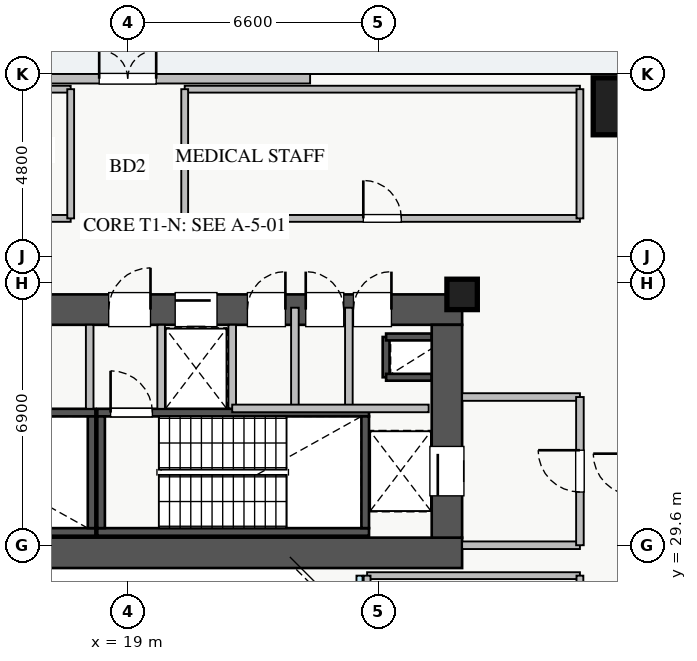
"""IFC4 building model, lengths in metres.
Left out: names, types, materials, properties, quantities, classifications, styles, units other than length and angle.
Written with IfcOpenShell. Run it as: python <this file> out.ifc"""

import sys

from ifc_helpers import new_model, si_unit, direction, frame, frame_2d, origin, origin_2d, place, context, subcontext, project, spatial, rectangle, extrude, source, transform, mapped, element, fill, save


model = new_model("IFC4")
c1 = context("Model", 3, precision=1e-05, world=origin(), true_north=direction((0.0, 1.0)))
c2 = subcontext(c1, "Body", "Model", "MODEL_VIEW")
j1 = project(units=[si_unit("LENGTHUNIT", "METRE"), si_unit("PLANEANGLEUNIT", "RADIAN")], contexts=[c1])
p1 = place(None, origin())
s1 = spatial("IfcSite", under=j1, at=p1, CompositionType="ELEMENT")
p2 = place(p1, origin())
s2 = spatial("IfcBuilding", under=s1, at=p2, CompositionType="ELEMENT")
p3 = place(p2, frame((0.0, 0.0, 9.4)))
s3 = spatial("IfcBuildingStorey", under=s2, at=p3, CompositionType="ELEMENT", Elevation=9.4)
p4 = place(p3, frame((25.8, 34.02, 0.0), z_axis=(0.0, 0.0, 1.0), x_axis=(0.0, 1.0, 0.0)))
e1 = element("IfcWall", 1, at=p4, inside=s3, PredefinedType="SHEAR", context=c2, shape_type="SweptSolid", body=[
    extrude(rectangle(XDim=1.06, YDim=0.18, at=frame_2d((0.53, 0.0))), origin(), (0.0, 0.0, 1.0), 4.18),
])
for number, where, z_axis, x_axis in (
    (2, (25.8, 35.08, 0.0), (0.0, 0.0, 1.0), (1.0, 0.0, 0.0)),
    (3, (25.8, 34.02, 0.0), (0.0, 0.0, 1.0), (1.0, 0.0, 0.0)),
):
    element("IfcWall", number, at=place(p3, frame(where, z_axis=z_axis, x_axis=x_axis)), inside=s3, PredefinedType="SHEAR", context=c2, shape_type="SweptSolid", body=[
        extrude(rectangle(XDim=1.2, YDim=0.18, at=frame_2d((0.6, 0.0))), origin(), (0.0, 0.0, 1.0), 4.18),
    ])
p5 = place(p3, frame((19.88, 33.2, 0.0), z_axis=(0.0, 0.0, 1.0), x_axis=(1.0, 0.0, 0.0)))
e4 = element("IfcWall", 4, at=p5, inside=s3, PredefinedType="SHEAR", context=c2, shape_type="SweptSolid", body=[
    extrude(rectangle(XDim=1.87, YDim=0.18, at=frame_2d((0.935, 0.0))), origin(), (0.0, 0.0, 1.0), 4.18),
])
p6 = place(p3, frame((11.0, 29.95, 0.0), z_axis=(0.0, 0.0, 1.0), x_axis=(1.0, 0.0, 0.0)))
e5 = element("IfcWall", 5, at=p6, inside=s3, PredefinedType="SHEAR", context=c2, shape_type="SweptSolid", body=[
    extrude(rectangle(XDim=7.15, YDim=0.2, at=frame_2d((3.575, 0.0))), origin(), (0.0, 0.0, 1.0), 4.4),
])
p7 = place(p3, frame((11.0, 33.09, 0.0), z_axis=(0.0, 0.0, 1.0), x_axis=(1.0, 0.0, 0.0)))
e6 = element("IfcWall", 6, at=p7, inside=s3, PredefinedType="SHEAR", context=c2, shape_type="SweptSolid", body=[
    extrude(rectangle(XDim=7.15, YDim=0.2, at=frame_2d((3.575, 0.0))), origin(), (0.0, 0.0, 1.0), 4.4),
])
p8 = place(p7, frame((0.35, 0.0, 0.0)))
e7 = element("IfcOpeningElement", 7, at=p8, cuts=e6, PredefinedType="OPENING", context=c2, shape_type="SweptSolid", body=[
    extrude(rectangle(XDim=1.1, YDim=2.05, at=frame_2d((0.55, 1.025))), frame((0.0, 0.11, 0.0), z_axis=(0.0, -1.0, 0.0), x_axis=(1.0, 0.0, 0.0)), (0.0, 0.0, 1.0), 0.22),
])
p9 = place(p3, frame((18.05, 30.05, 0.0), z_axis=(0.0, 0.0, 1.0), x_axis=(0.0, 1.0, 0.0)))
e8 = element("IfcWall", 8, at=p9, inside=s3, PredefinedType="SHEAR", context=c2, shape_type="SweptSolid", body=[
    extrude(rectangle(XDim=2.94, YDim=0.2, at=frame_2d((1.47, 0.0))), origin(), (0.0, 0.0, 1.0), 4.4),
])
p10 = place(p3, frame((18.2, 29.95, 0.0), z_axis=(0.0, 0.0, 1.0), x_axis=(1.0, 0.0, 0.0)))
e9 = element("IfcWall", 9, at=p10, inside=s3, PredefinedType="SHEAR", context=c2, shape_type="SweptSolid", body=[
    extrude(rectangle(XDim=7.15, YDim=0.2, at=frame_2d((3.575, 0.0))), origin(), (0.0, 0.0, 1.0), 4.4),
])
p11 = place(p3, frame((18.2, 33.09, 0.0), z_axis=(0.0, 0.0, 1.0), x_axis=(1.0, 0.0, 0.0)))
e10 = element("IfcWall", 10, at=p11, inside=s3, PredefinedType="SHEAR", context=c2, shape_type="SweptSolid", body=[
    extrude(rectangle(XDim=7.15, YDim=0.2, at=frame_2d((3.575, 0.0))), origin(), (0.0, 0.0, 1.0), 4.4),
])
p12 = place(p11, frame((0.35, 0.0, 0.0)))
e11 = element("IfcOpeningElement", 11, at=p12, cuts=e10, PredefinedType="OPENING", context=c2, shape_type="SweptSolid", body=[
    extrude(rectangle(XDim=1.1, YDim=2.05, at=frame_2d((0.55, 1.025))), frame((0.0, 0.11, 0.0), z_axis=(0.0, -1.0, 0.0), x_axis=(1.0, 0.0, 0.0)), (0.0, 0.0, 1.0), 0.22),
])
for number, where, z_axis, x_axis in (
    (12, (18.3, 30.05, 0.0), (0.0, 0.0, 1.0), (0.0, 1.0, 0.0)),
    (13, (25.25, 30.05, 0.0), (0.0, 0.0, 1.0), (0.0, 1.0, 0.0)),
):
    element("IfcWall", number, at=place(p3, frame(where, z_axis=z_axis, x_axis=x_axis)), inside=s3, PredefinedType="SHEAR", context=c2, shape_type="SweptSolid", body=[
        extrude(rectangle(XDim=2.94, YDim=0.2, at=frame_2d((1.47, 0.0))), origin(), (0.0, 0.0, 1.0), 4.4),
    ])
p13 = place(p3, frame((10.2, 29.4, 0.0), z_axis=(0.0, 0.0, 1.0), x_axis=(1.0, 0.0, 0.0)))
e14 = element("IfcWall", 14, at=p13, inside=s3, PredefinedType="SHEAR", context=c2, shape_type="SweptSolid", body=[
    extrude(rectangle(XDim=17.6, YDim=0.8, at=frame_2d((8.8, 0.0))), origin(), (0.0, 0.0, 1.0), 4.4),
])
p14 = place(p3, frame((10.2, 35.8, 0.0), z_axis=(0.0, 0.0, 1.0), x_axis=(1.0, 0.0, 0.0)))
e15 = element("IfcWall", 15, at=p14, inside=s3, PredefinedType="SHEAR", context=c2, shape_type="SweptSolid", body=[
    extrude(rectangle(XDim=17.6, YDim=0.8, at=frame_2d((8.8, 0.0))), origin(), (0.0, 0.0, 1.0), 4.4),
])
p15 = place(p14, frame((1.15, 0.0, 0.0)))
e16 = element("IfcOpeningElement", 16, at=p15, cuts=e15, PredefinedType="OPENING", context=c2, shape_type="SweptSolid", body=[
    extrude(rectangle(XDim=1.1, YDim=2.05, at=frame_2d((0.55, 1.025))), frame((0.0, 0.41, 0.0), z_axis=(0.0, -1.0, 0.0), x_axis=(1.0, 0.0, 0.0)), (0.0, 0.0, 1.0), 0.82),
])
p16 = place(p14, frame((8.3, 0.0, 0.0)))
e17 = element("IfcOpeningElement", 17, at=p16, cuts=e15, PredefinedType="OPENING", context=c2, shape_type="SweptSolid", body=[
    extrude(rectangle(XDim=1.1, YDim=2.05, at=frame_2d((0.55, 1.025))), frame((0.0, 0.41, 0.0), z_axis=(0.0, -1.0, 0.0), x_axis=(1.0, 0.0, 0.0)), (0.0, 0.0, 1.0), 0.82),
])
p17 = place(p14, frame((10.05, 0.0, 0.0)))
e18 = element("IfcOpeningElement", 18, at=p17, cuts=e15, PredefinedType="OPENING", context=c2, shape_type="SweptSolid", body=[
    extrude(rectangle(XDim=1.1, YDim=2.05, at=frame_2d((0.55, 1.025))), frame((0.0, 0.41, 0.0), z_axis=(0.0, -1.0, 0.0), x_axis=(1.0, 0.0, 0.0)), (0.0, 0.0, 1.0), 0.82),
])
p18 = place(p14, frame((14.74, 0.0, 0.0)))
e19 = element("IfcOpeningElement", 19, at=p18, cuts=e15, PredefinedType="OPENING", context=c2, shape_type="SweptSolid", body=[
    extrude(rectangle(XDim=1.0, YDim=2.05, at=frame_2d((0.5, 1.025))), frame((0.0, 0.41, 0.0), z_axis=(0.0, -1.0, 0.0), x_axis=(1.0, 0.0, 0.0)), (0.0, 0.0, 1.0), 0.82),
])
p19 = place(p14, frame((11.95, 0.0, 0.0)))
e20 = element("IfcOpeningElement", 20, at=p19, cuts=e15, PredefinedType="OPENING", context=c2, shape_type="SweptSolid", body=[
    extrude(rectangle(XDim=1.0, YDim=2.05, at=frame_2d((0.5, 1.025))), frame((0.0, 0.41, 0.0), z_axis=(0.0, -1.0, 0.0), x_axis=(1.0, 0.0, 0.0)), (0.0, 0.0, 1.0), 0.82),
])
p20 = place(p14, frame((13.485, 0.0, 0.0)))
e21 = element("IfcOpeningElement", 21, at=p20, cuts=e15, PredefinedType="OPENING", context=c2, shape_type="SweptSolid", body=[
    extrude(rectangle(XDim=1.0, YDim=2.05, at=frame_2d((0.5, 1.025))), frame((0.0, 0.41, 0.0), z_axis=(0.0, -1.0, 0.0), x_axis=(1.0, 0.0, 0.0)), (0.0, 0.0, 1.0), 0.82),
])
p21 = place(p3, frame((27.4, 29.8, 0.0), z_axis=(0.0, 0.0, 1.0), x_axis=(0.0, 1.0, 0.0)))
e22 = element("IfcWall", 22, at=p21, inside=s3, PredefinedType="SHEAR", context=c2, shape_type="SweptSolid", body=[
    extrude(rectangle(XDim=5.6, YDim=0.8, at=frame_2d((2.8, 0.0))), origin(), (0.0, 0.0, 1.0), 4.4),
])
p22 = place(p21, frame((1.1, 0.0, 0.0)))
e23 = element("IfcOpeningElement", 23, at=p22, cuts=e22, PredefinedType="OPENING", context=c2, shape_type="SweptSolid", body=[
    extrude(rectangle(XDim=1.3, YDim=2.05, at=frame_2d((0.65, 1.025))), frame((0.0, 0.41, 0.0), z_axis=(0.0, -1.0, 0.0), x_axis=(1.0, 0.0, 0.0)), (0.0, 0.0, 1.0), 0.82),
])
m1 = source(origin(), c2, "Body", "SweptSolid", [
    extrude(rectangle(XDim=1.5, YDim=1.5, at=origin_2d()), origin(), (0.0, 0.0, 1.0), 4.4),
])
p23 = place(p3, frame((32.0, 41.15, 0.0), z_axis=(0.0, 0.0, 1.0), x_axis=(1.0, 0.0, 0.0)))
e24 = element("IfcColumn", 24, at=p23, inside=s3, PredefinedType="COLUMN", context=c2, shape_type="MappedRepresentation", body=[
    mapped(m1, transform((0.0, 0.0, 0.0), x_axis=(1.0, 0.0, 0.0), y_axis=(0.0, 1.0, 0.0), z_axis=(0.0, 0.0, 1.0), scale=1.0)),
])
m2 = source(origin(), c2, "Body", "SweptSolid", [
    extrude(rectangle(XDim=0.8, YDim=0.8, at=origin_2d()), origin(), (0.0, 0.0, 1.0), 4.4),
])
p24 = place(p3, frame((27.8, 36.2, 0.0), z_axis=(0.0, 0.0, 1.0), x_axis=(1.0, 0.0, 0.0)))
e25 = element("IfcColumn", 25, at=p24, inside=s3, PredefinedType="PILASTER", context=c2, shape_type="MappedRepresentation", body=[
    mapped(m2, transform((0.0, 0.0, 0.0), x_axis=(1.0, 0.0, 0.0), y_axis=(0.0, 1.0, 0.0), z_axis=(0.0, 0.0, 1.0), scale=1.0)),
])
p25 = place(p3, frame((14.2, 41.875, 0.0), z_axis=(0.0, 0.0, 1.0), x_axis=(1.0, 0.0, 0.0)))
e26 = element("IfcWall", 26, at=p25, inside=s3, PredefinedType="STANDARD", context=c2, shape_type="SweptSolid", body=[
    extrude(rectangle(XDim=9.6, YDim=0.25, at=frame_2d((4.8, 0.0))), origin(), (0.0, 0.0, 1.0), 3.72),
])
p26 = place(p25, frame((4.05, 0.0, 0.0)))
e27 = element("IfcOpeningElement", 27, at=p26, cuts=e26, PredefinedType="OPENING", context=c2, shape_type="SweptSolid", body=[
    extrude(rectangle(XDim=1.5, YDim=2.15, at=frame_2d((0.75, 1.075))), frame((0.0, 0.135, 0.0), z_axis=(0.0, -1.0, 0.0), x_axis=(1.0, 0.0, 0.0)), (0.0, 0.0, 1.0), 0.27),
])
p27 = place(p3, frame((27.8, 29.6, 0.0), z_axis=(0.0, 0.0, 1.0), x_axis=(1.0, 0.0, 0.0)))
e28 = element("IfcWall", 28, at=p27, inside=s3, PredefinedType="PARTITIONING", context=c2, shape_type="SweptSolid", body=[
    extrude(rectangle(XDim=3.1, YDim=0.2, at=frame_2d((1.55, 0.0))), origin(), (0.0, 0.0, 1.0), 3.475),
])
p28 = place(p3, frame((27.8, 33.5, 0.0), z_axis=(0.0, 0.0, 1.0), x_axis=(1.0, 0.0, 0.0)))
e29 = element("IfcWall", 29, at=p28, inside=s3, PredefinedType="PARTITIONING", context=c2, shape_type="SweptSolid", body=[
    extrude(rectangle(XDim=3.1, YDim=0.2, at=frame_2d((1.55, 0.0))), origin(), (0.0, 0.0, 1.0), 3.325),
])
p29 = place(p3, frame((30.9, 29.6, 0.0), z_axis=(0.0, 0.0, 1.0), x_axis=(0.0, 1.0, 0.0)))
e30 = element("IfcWall", 30, at=p29, inside=s3, PredefinedType="PARTITIONING", context=c2, shape_type="SweptSolid", body=[
    extrude(rectangle(XDim=3.9, YDim=0.2, at=frame_2d((1.95, 0.0))), origin(), (0.0, 0.0, 1.0), 4.18),
])
p30 = place(p29, frame((1.4, 0.0, 0.0)))
e31 = element("IfcOpeningElement", 31, at=p30, cuts=e30, PredefinedType="OPENING", context=c2, shape_type="SweptSolid", body=[
    extrude(rectangle(XDim=1.1, YDim=2.05, at=frame_2d((0.55, 1.025))), frame((0.0, 0.11, 0.0), z_axis=(0.0, -1.0, 0.0), x_axis=(1.0, 0.0, 0.0)), (0.0, 0.0, 1.0), 0.22),
])
for number, where, z_axis, x_axis in (
    (32, (18.0, 33.19, 0.0), (0.0, 0.0, 1.0), (0.0, 1.0, 0.0)),
    (33, (19.88, 33.19, 0.0), (0.0, 0.0, 1.0), (0.0, 1.0, 0.0)),
):
    element("IfcWall", number, at=place(p3, frame(where, z_axis=z_axis, x_axis=x_axis)), inside=s3, PredefinedType="PARTITIONING", context=c2, shape_type="SweptSolid", body=[
        extrude(rectangle(XDim=2.21, YDim=0.2, at=frame_2d((1.105, 0.0))), origin(), (0.0, 0.0, 1.0), 4.18),
    ])
p31 = place(p3, frame((24.82, 33.2, 0.0), z_axis=(0.0, 0.0, 1.0), x_axis=(0.0, 1.0, 0.0)))
e34 = element("IfcWall", 34, at=p31, inside=s3, PredefinedType="PARTITIONING", context=c2, shape_type="SweptSolid", body=[
    extrude(rectangle(XDim=2.65, YDim=0.2, at=frame_2d((1.325, 0.0))), origin(), (0.0, 0.0, 1.0), 4.18),
])
p32 = place(p3, frame((21.75, 33.2, 0.0), z_axis=(0.0, 0.0, 1.0), x_axis=(0.0, 1.0, 0.0)))
e35 = element("IfcWall", 35, at=p32, inside=s3, PredefinedType="PARTITIONING", context=c2, shape_type="SweptSolid", body=[
    extrude(rectangle(XDim=2.2, YDim=0.2, at=frame_2d((1.1, 0.0))), origin(), (0.0, 0.0, 1.0), 4.18),
])
p33 = place(p3, frame((23.4, 33.2, 0.0), z_axis=(0.0, 0.0, 1.0), x_axis=(0.0, 1.0, 0.0)))
e36 = element("IfcWall", 36, at=p33, inside=s3, PredefinedType="PARTITIONING", context=c2, shape_type="SweptSolid", body=[
    extrude(rectangle(XDim=2.65, YDim=0.2, at=frame_2d((1.325, 0.0))), origin(), (0.0, 0.0, 1.0), 4.18),
])
p34 = place(p3, frame((21.75, 33.2, 0.0), z_axis=(0.0, 0.0, 1.0), x_axis=(1.0, 0.0, 0.0)))
e37 = element("IfcWall", 37, at=p34, inside=s3, PredefinedType="PARTITIONING", context=c2, shape_type="SweptSolid", body=[
    extrude(rectangle(XDim=5.17, YDim=0.2, at=frame_2d((2.585, 0.0))), origin(), (0.0, 0.0, 1.0), 4.18),
])
p35 = place(p3, frame((25.3, 28.8, 0.0), z_axis=(0.0, 0.0, 1.0), x_axis=(1.0, 0.0, 0.0)))
e38 = element("IfcWall", 38, at=p35, inside=s3, PredefinedType="PARTITIONING", context=c2, shape_type="SweptSolid", body=[
    extrude(rectangle(XDim=5.6, YDim=0.18, at=frame_2d((2.8, 0.0))), origin(), (0.0, 0.0, 1.0), 4.18),
])
p36 = place(p3, frame((25.3, 17.2, 0.0), z_axis=(0.0, 0.0, 1.0), x_axis=(0.0, 1.0, 0.0)))
e39 = element("IfcWall", 39, at=p36, inside=s3, PredefinedType="PARTITIONING", context=c2, shape_type="SweptSolid", body=[
    extrude(rectangle(XDim=11.6, YDim=0.18, at=frame_2d((5.8, 0.0))), origin(), (0.0, 0.0, 1.0), 4.18),
])
p37 = place(p3, frame((30.9, 17.2, 0.0), z_axis=(0.0, 0.0, 1.0), x_axis=(0.0, 1.0, 0.0)))
e40 = element("IfcWall", 40, at=p37, inside=s3, PredefinedType="PARTITIONING", context=c2, shape_type="SweptSolid", body=[
    extrude(rectangle(XDim=11.6, YDim=0.18, at=frame_2d((5.8, 0.0))), origin(), (0.0, 0.0, 1.0), 4.18),
])
p38 = place(p37, frame((5.3, 0.0, 0.0)))
e41 = element("IfcOpeningElement", 41, at=p38, cuts=e40, PredefinedType="OPENING", context=c2, shape_type="SweptSolid", body=[
    extrude(rectangle(XDim=1.0, YDim=2.05, at=frame_2d((0.5, 1.025))), frame((0.0, 0.1, 0.0), z_axis=(0.0, -1.0, 0.0), x_axis=(1.0, 0.0, 0.0)), (0.0, 0.0, 1.0), 0.2),
])
p39 = place(p3, frame((10.2, 38.2, 0.0), z_axis=(0.0, 0.0, 1.0), x_axis=(1.0, 0.0, 0.0)))
e42 = element("IfcWall", 42, at=p39, inside=s3, PredefinedType="PARTITIONING", context=c2, shape_type="SweptSolid", body=[
    extrude(rectangle(XDim=7.3, YDim=0.18, at=frame_2d((3.65, 0.0))), origin(), (0.0, 0.0, 1.0), 4.18),
])
p40 = place(p39, frame((3.15, 0.0, 0.0)))
e43 = element("IfcOpeningElement", 43, at=p40, cuts=e42, PredefinedType="OPENING", context=c2, shape_type="SweptSolid", body=[
    extrude(rectangle(XDim=1.0, YDim=2.05, at=frame_2d((0.5, 1.025))), frame((0.0, 0.1, 0.0), z_axis=(0.0, -1.0, 0.0), x_axis=(1.0, 0.0, 0.0)), (0.0, 0.0, 1.0), 0.2),
])
p41 = place(p3, frame((10.2, 41.6, 0.0), z_axis=(0.0, 0.0, 1.0), x_axis=(1.0, 0.0, 0.0)))
e44 = element("IfcWall", 44, at=p41, inside=s3, PredefinedType="PARTITIONING", context=c2, shape_type="SweptSolid", body=[
    extrude(rectangle(XDim=7.3, YDim=0.18, at=frame_2d((3.65, 0.0))), origin(), (0.0, 0.0, 1.0), 4.18),
])
p42 = place(p3, frame((17.5, 38.2, 0.0), z_axis=(0.0, 0.0, 1.0), x_axis=(0.0, 1.0, 0.0)))
e45 = element("IfcWall", 45, at=p42, inside=s3, PredefinedType="PARTITIONING", context=c2, shape_type="SweptSolid", body=[
    extrude(rectangle(XDim=3.4, YDim=0.18, at=frame_2d((1.7, 0.0))), origin(), (0.0, 0.0, 1.0), 4.18),
])
p43 = place(p3, frame((20.5, 38.2, 0.0), z_axis=(0.0, 0.0, 1.0), x_axis=(1.0, 0.0, 0.0)))
e46 = element("IfcWall", 46, at=p43, inside=s3, PredefinedType="PARTITIONING", context=c2, shape_type="SweptSolid", body=[
    extrude(rectangle(XDim=10.4, YDim=0.18, at=frame_2d((5.2, 0.0))), origin(), (0.0, 0.0, 1.0), 4.18),
])
p44 = place(p43, frame((4.7, 0.0, 0.0)))
e47 = element("IfcOpeningElement", 47, at=p44, cuts=e46, PredefinedType="OPENING", context=c2, shape_type="SweptSolid", body=[
    extrude(rectangle(XDim=1.0, YDim=2.05, at=frame_2d((0.5, 1.025))), frame((0.0, 0.1, 0.0), z_axis=(0.0, -1.0, 0.0), x_axis=(1.0, 0.0, 0.0)), (0.0, 0.0, 1.0), 0.2),
])
p45 = place(p3, frame((20.5, 41.6, 0.0), z_axis=(0.0, 0.0, 1.0), x_axis=(1.0, 0.0, 0.0)))
e48 = element("IfcWall", 48, at=p45, inside=s3, PredefinedType="PARTITIONING", context=c2, shape_type="SweptSolid", body=[
    extrude(rectangle(XDim=10.4, YDim=0.18, at=frame_2d((5.2, 0.0))), origin(), (0.0, 0.0, 1.0), 4.18),
])
for number, where, z_axis, x_axis in (
    (49, (20.5, 38.2, 0.0), (0.0, 0.0, 1.0), (0.0, 1.0, 0.0)),
    (50, (30.9, 38.2, 0.0), (0.0, 0.0, 1.0), (0.0, 1.0, 0.0)),
):
    element("IfcWall", number, at=place(p3, frame(where, z_axis=z_axis, x_axis=x_axis)), inside=s3, PredefinedType="PARTITIONING", context=c2, shape_type="SweptSolid", body=[
        extrude(rectangle(XDim=3.4, YDim=0.18, at=frame_2d((1.7, 0.0))), origin(), (0.0, 0.0, 1.0), 4.18),
    ])
m3 = source(origin(), c2, "Body", "SweptSolid", [
    extrude(rectangle(XDim=1.5, YDim=2.15, at=frame_2d((0.75, 1.075))), frame((0.0, 0.025, 0.0), z_axis=(0.0, -1.0, 0.0), x_axis=(1.0, 0.0, 0.0)), (0.0, 0.0, 1.0), 0.05),
])
p46 = place(p26, origin())
e51 = element("IfcDoor", 51, at=p46, inside=s3, OperationType="DOUBLE_DOOR_SINGLE_SWING", PredefinedType="DOOR", context=c2, shape_type="MappedRepresentation", body=[
    mapped(m3, transform((0.0, 0.0, 0.0), x_axis=(1.0, 0.0, 0.0), y_axis=(0.0, 1.0, 0.0), z_axis=(0.0, 0.0, 1.0), scale=1.0)),
])
fill(e27, e51)
m4 = source(origin(), c2, "Body", "SweptSolid", [
    extrude(rectangle(XDim=1.3, YDim=2.05, at=frame_2d((0.65, 1.025))), frame((0.0, 0.025, 0.0), z_axis=(0.0, -1.0, 0.0), x_axis=(1.0, 0.0, 0.0)), (0.0, 0.0, 1.0), 0.05),
])
p47 = place(p22, origin())
e52 = element("IfcDoor", 52, at=p47, inside=s3, OperationType="SLIDING_TO_LEFT", PredefinedType="DOOR", context=c2, shape_type="MappedRepresentation", body=[
    mapped(m4, transform((0.0, 0.0, 0.0), x_axis=(1.0, 0.0, 0.0), y_axis=(0.0, 1.0, 0.0), z_axis=(0.0, 0.0, 1.0), scale=1.0)),
])
fill(e23, e52)
m5 = source(origin(), c2, "Body", "SweptSolid", [
    extrude(rectangle(XDim=1.1, YDim=2.05, at=frame_2d((0.55, 1.025))), frame((0.0, 0.025, 0.0), z_axis=(0.0, -1.0, 0.0), x_axis=(1.0, 0.0, 0.0)), (0.0, 0.0, 1.0), 0.05),
])
p48 = place(p16, origin())
e53 = element("IfcDoor", 53, at=p48, inside=s3, OperationType="SINGLE_SWING_RIGHT", PredefinedType="DOOR", context=c2, shape_type="MappedRepresentation", body=[
    mapped(m5, transform((0.0, 0.0, 0.0), x_axis=(1.0, 0.0, 0.0), y_axis=(0.0, 1.0, 0.0), z_axis=(0.0, 0.0, 1.0), scale=1.0)),
])
fill(e17, e53)
p49 = place(p12, origin())
e54 = element("IfcDoor", 54, at=p49, inside=s3, OperationType="SINGLE_SWING_LEFT", PredefinedType="DOOR", context=c2, shape_type="MappedRepresentation", body=[
    mapped(m5, transform((0.0, 0.0, 0.0), x_axis=(1.0, 0.0, 0.0), y_axis=(0.0, 1.0, 0.0), z_axis=(0.0, 0.0, 1.0), scale=1.0)),
])
fill(e11, e54)
p50 = place(p17, origin())
e55 = element("IfcDoor", 55, at=p50, inside=s3, OperationType="SLIDING_TO_LEFT", PredefinedType="DOOR", context=c2, shape_type="MappedRepresentation", body=[
    mapped(m5, transform((0.0, 0.0, 0.0), x_axis=(1.0, 0.0, 0.0), y_axis=(0.0, 1.0, 0.0), z_axis=(0.0, 0.0, 1.0), scale=1.0)),
])
fill(e18, e55)
m6 = source(origin(), c2, "Body", "SweptSolid", [
    extrude(rectangle(XDim=1.0, YDim=2.05, at=frame_2d((0.5, 1.025))), frame((0.0, 0.025, 0.0), z_axis=(0.0, -1.0, 0.0), x_axis=(1.0, 0.0, 0.0)), (0.0, 0.0, 1.0), 0.05),
])
p51 = place(p18, origin())
e56 = element("IfcDoor", 56, at=p51, inside=s3, OperationType="SINGLE_SWING_RIGHT", PredefinedType="DOOR", context=c2, shape_type="MappedRepresentation", body=[
    mapped(m6, transform((0.0, 0.0, 0.0), x_axis=(1.0, 0.0, 0.0), y_axis=(0.0, 1.0, 0.0), z_axis=(0.0, 0.0, 1.0), scale=1.0)),
])
fill(e19, e56)
p52 = place(p19, origin())
e57 = element("IfcDoor", 57, at=p52, inside=s3, OperationType="SINGLE_SWING_RIGHT", PredefinedType="DOOR", context=c2, shape_type="MappedRepresentation", body=[
    mapped(m6, transform((0.0, 0.0, 0.0), x_axis=(1.0, 0.0, 0.0), y_axis=(0.0, 1.0, 0.0), z_axis=(0.0, 0.0, 1.0), scale=1.0)),
])
fill(e20, e57)
p53 = place(p20, origin())
e58 = element("IfcDoor", 58, at=p53, inside=s3, OperationType="SINGLE_SWING_LEFT", PredefinedType="DOOR", context=c2, shape_type="MappedRepresentation", body=[
    mapped(m6, transform((0.0, 0.0, 0.0), x_axis=(1.0, 0.0, 0.0), y_axis=(0.0, 1.0, 0.0), z_axis=(0.0, 0.0, 1.0), scale=1.0)),
])
fill(e21, e58)
p54 = place(p30, origin())
e59 = element("IfcDoor", 59, at=p54, inside=s3, OperationType="SINGLE_SWING_RIGHT", PredefinedType="DOOR", context=c2, shape_type="MappedRepresentation", body=[
    mapped(m5, transform((0.0, 0.0, 0.0), x_axis=(1.0, 0.0, 0.0), y_axis=(0.0, 1.0, 0.0), z_axis=(0.0, 0.0, 1.0), scale=1.0)),
])
fill(e31, e59)
p55 = place(p44, origin())
e60 = element("IfcDoor", 60, at=p55, inside=s3, OperationType="SINGLE_SWING_LEFT", PredefinedType="DOOR", context=c2, shape_type="MappedRepresentation", body=[
    mapped(m6, transform((0.0, 0.0, 0.0), x_axis=(1.0, 0.0, 0.0), y_axis=(0.0, 1.0, 0.0), z_axis=(0.0, 0.0, 1.0), scale=1.0)),
])
fill(e47, e60)
save(model, sys.argv[1])
